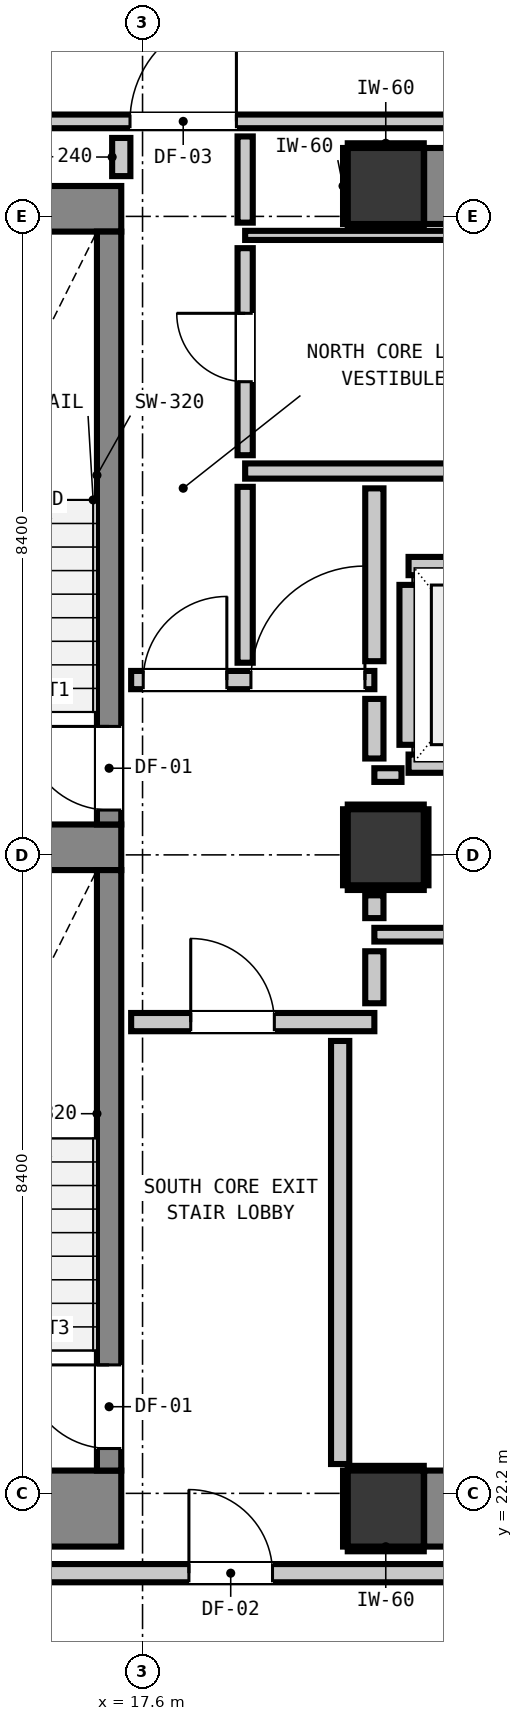
"""IFC4 building model, lengths in metres.
Left out: names, types, materials, properties, quantities, classifications, styles, units other than length and angle.
Written with IfcOpenShell. Run it as: python <this file> out.ifc"""

import sys

from ifc_helpers import new_model, si_unit, direction, frame, frame_2d, origin, origin_2d, place, context, subcontext, project, spatial, rectangle, extrude, element, fill, save


model = new_model("IFC4")
c1 = context("Model", 3, precision=1e-05, world=origin(), true_north=direction((0.0, 1.0)))
c2 = subcontext(c1, "Body", "Model", "MODEL_VIEW")
j1 = project(units=[si_unit("LENGTHUNIT", "METRE"), si_unit("PLANEANGLEUNIT", "RADIAN")], contexts=[c1])
p1 = place(None, origin())
s1 = spatial("IfcSite", under=j1, at=p1, CompositionType="ELEMENT")
p2 = place(p1, origin())
s2 = spatial("IfcBuilding", under=s1, at=p2, CompositionType="ELEMENT")
p3 = place(p2, frame((0.0, 0.0, 92.8)))
s3 = spatial("IfcBuildingStorey", under=s2, at=p3, CompositionType="ELEMENT", Elevation=92.8)
for number, where, z_axis, x_axis in (
    (1, (20.8, 22.0, 0.0), (0.0, 0.0, 1.0), (1.0, 0.0, 0.0)),
    (2, (20.8, 39.4, 0.0), (0.0, 0.0, 1.0), (1.0, 0.0, 0.0)),
):
    element("IfcColumn", number, at=place(p3, frame(where, z_axis=z_axis, x_axis=x_axis)), inside=s3, PredefinedType="COLUMN", context=c2, shape_type="SweptSolid", body=[
        extrude(rectangle(XDim=1.0, YDim=1.0, at=origin_2d()), origin(), (0.0, 0.0, 1.0), 3.32),
    ])
p4 = place(p3, frame((13.24, 22.0, 0.0), z_axis=(0.0, 0.0, 1.0), x_axis=(1.0, 0.0, 0.0)))
e3 = element("IfcWall", 3, at=p4, inside=s3, PredefinedType="SHEAR", context=c2, shape_type="SweptSolid", body=[
    extrude(rectangle(XDim=4.08, YDim=1.0, at=frame_2d((2.04, 0.0))), origin(), (0.0, 0.0, 1.0), 3.32),
])
p5 = place(p3, frame((13.24, 39.1, 0.0), z_axis=(0.0, 0.0, 1.0), x_axis=(1.0, 0.0, 0.0)))
e4 = element("IfcWall", 4, at=p5, inside=s3, PredefinedType="SHEAR", context=c2, shape_type="SweptSolid", body=[
    extrude(rectangle(XDim=4.08, YDim=0.6, at=frame_2d((2.04, 0.0))), origin(), (0.0, 0.0, 1.0), 3.32),
])
p6 = place(p3, frame((13.905, 30.7, 0.0), z_axis=(0.0, 0.0, 1.0), x_axis=(1.0, 0.0, 0.0)))
e5 = element("IfcWall", 5, at=p6, inside=s3, PredefinedType="SHEAR", context=c2, shape_type="SweptSolid", body=[
    extrude(rectangle(XDim=3.415, YDim=0.6, at=frame_2d((1.708, 0.0))), origin(), (0.0, 0.0, 1.0), 3.32),
])
for number, where, z_axis, x_axis in (
    (6, (21.305, 22.0, 0.0), (0.0, 0.0, 1.0), (1.0, 0.0, 0.0)),
    (7, (21.305, 39.4, 0.0), (0.0, 0.0, 1.0), (1.0, 0.0, 0.0)),
):
    element("IfcWall", number, at=place(p3, frame(where, z_axis=z_axis, x_axis=x_axis)), inside=s3, PredefinedType="SHEAR", context=c2, shape_type="SweptSolid", body=[
        extrude(rectangle(XDim=7.39, YDim=1.0, at=frame_2d((3.695, 0.0))), origin(), (0.0, 0.0, 1.0), 3.32),
    ])
p7 = place(p3, frame((17.16, 31.0, 0.0), z_axis=(0.0, 0.0, 1.0), x_axis=(0.0, 1.0, 0.0)))
e8 = element("IfcWall", 8, at=p7, inside=s3, PredefinedType="SHEAR", context=c2, shape_type="SweptSolid", body=[
    extrude(rectangle(XDim=7.8, YDim=0.32, at=frame_2d((3.9, 0.0))), origin(), (0.0, 0.0, 1.0), 3.32),
])
p8 = place(p7, frame((0.19, 0.0, 0.0)))
e9 = element("IfcOpeningElement", 9, at=p8, cuts=e8, PredefinedType="OPENING", context=c2, shape_type="SweptSolid", body=[
    extrude(rectangle(XDim=1.1, YDim=2.15, at=frame_2d((0.55, 1.075))), frame((0.0, 0.17, 0.0), z_axis=(0.0, -1.0, 0.0), x_axis=(1.0, 0.0, 0.0)), (0.0, 0.0, 1.0), 0.34),
])
p9 = place(p3, frame((17.16, 22.5, 0.0), z_axis=(0.0, 0.0, 1.0), x_axis=(0.0, 1.0, 0.0)))
e10 = element("IfcWall", 10, at=p9, inside=s3, PredefinedType="SHEAR", context=c2, shape_type="SweptSolid", body=[
    extrude(rectangle(XDim=7.9, YDim=0.32, at=frame_2d((3.95, 0.0))), origin(), (0.0, 0.0, 1.0), 3.32),
])
p10 = place(p9, frame((0.29, 0.0, 0.0)))
e11 = element("IfcOpeningElement", 11, at=p10, cuts=e10, PredefinedType="OPENING", context=c2, shape_type="SweptSolid", body=[
    extrude(rectangle(XDim=1.1, YDim=2.15, at=frame_2d((0.55, 1.075))), frame((0.0, 0.17, 0.0), z_axis=(0.0, -1.0, 0.0), x_axis=(1.0, 0.0, 0.0)), (0.0, 0.0, 1.0), 0.34),
])
p11 = place(p3, frame((20.8, 30.7, 0.0), z_axis=(0.0, 0.0, 1.0), x_axis=(1.0, 0.0, 0.0)))
e12 = element("IfcColumn", 12, at=p11, inside=s3, PredefinedType="COLUMN", context=c2, shape_type="SweptSolid", body=[
    extrude(rectangle(XDim=1.0, YDim=1.0, at=origin_2d()), origin(), (0.0, 0.0, 1.0), 3.32),
])
for number, where, z_axis, x_axis in (
    (13, (21.1, 31.8, 0.0), (0.0, 0.0, 1.0), (1.0, 0.0, 0.0)),
    (14, (21.1, 34.4, 0.0), (0.0, 0.0, 1.0), (1.0, 0.0, 0.0)),
):
    element("IfcWall", number, at=place(p3, frame(where, z_axis=z_axis, x_axis=x_axis)), inside=s3, PredefinedType="PARTITIONING", context=c2, shape_type="SweptSolid", body=[
        extrude(rectangle(XDim=2.2, YDim=0.24, at=frame_2d((1.1, 0.0))), origin(), (0.0, 0.0, 1.0), 3.06),
    ])
p12 = place(p3, frame((21.1, 32.048, 0.0), z_axis=(0.0, 0.0, 1.0), x_axis=(0.0, 1.0, 0.0)))
e15 = element("IfcWall", 15, at=p12, inside=s3, PredefinedType="PARTITIONING", context=c2, shape_type="SweptSolid", body=[
    extrude(rectangle(XDim=2.104, YDim=0.24, at=frame_2d((1.052, 0.0))), origin(), (0.0, 0.0, 1.0), 2.295),
])
p13 = place(p3, frame((12.993, 21.15, 0.0), z_axis=(0.0, 0.0, 1.0), x_axis=(1.0, 0.0, 0.0)))
e16 = element("IfcWall", 16, at=p13, inside=s3, PredefinedType="PARTITIONING", context=c2, shape_type="SweptSolid", body=[
    extrude(rectangle(XDim=30.98, YDim=0.24, at=frame_2d((15.49, 0.0))), origin(), (0.0, 0.0, 1.0), 3.06),
])
p14 = place(p13, frame((5.217, 0.0, 0.0)))
e17 = element("IfcOpeningElement", 17, at=p14, cuts=e16, PredefinedType="OPENING", context=c2, shape_type="SweptSolid", body=[
    extrude(rectangle(XDim=1.1, YDim=2.15, at=frame_2d((0.55, 1.075))), frame((0.0, 0.13, 0.0), z_axis=(0.0, -1.0, 0.0), x_axis=(1.0, 0.0, 0.0)), (0.0, 0.0, 1.0), 0.26),
])
p15 = place(p13, frame((25.057, 0.0, 0.0)))
e18 = element("IfcOpeningElement", 18, at=p15, cuts=e16, PredefinedType="OPENING", context=c2, shape_type="SweptSolid", body=[
    extrude(rectangle(XDim=1.4, YDim=2.15, at=frame_2d((0.7, 1.075))), frame((0.0, 0.13, 0.0), z_axis=(0.0, -1.0, 0.0), x_axis=(1.0, 0.0, 0.0)), (0.0, 0.0, 1.0), 0.26),
])
p16 = place(p3, frame((17.45, 28.4, 0.0), z_axis=(0.0, 0.0, 1.0), x_axis=(1.0, 0.0, 0.0)))
e19 = element("IfcWall", 19, at=p16, inside=s3, PredefinedType="PARTITIONING", context=c2, shape_type="SweptSolid", body=[
    extrude(rectangle(XDim=3.2, YDim=0.24, at=frame_2d((1.6, 0.0))), origin(), (0.0, 0.0, 1.0), 3.06),
])
p17 = place(p16, frame((0.784, 0.0, 0.0)))
e20 = element("IfcOpeningElement", 20, at=p17, cuts=e19, PredefinedType="OPENING", context=c2, shape_type="SweptSolid", body=[
    extrude(rectangle(XDim=1.1, YDim=2.15, at=frame_2d((0.55, 1.075))), frame((0.0, 0.13, 0.0), z_axis=(0.0, -1.0, 0.0), x_axis=(1.0, 0.0, 0.0)), (0.0, 0.0, 1.0), 0.26),
])
p18 = place(p3, frame((17.45, 32.9, 0.0), z_axis=(0.0, 0.0, 1.0), x_axis=(1.0, 0.0, 0.0)))
e21 = element("IfcWall", 21, at=p18, inside=s3, PredefinedType="PARTITIONING", context=c2, shape_type="SweptSolid", body=[
    extrude(rectangle(XDim=3.2, YDim=0.24, at=frame_2d((1.6, 0.0))), origin(), (0.0, 0.0, 1.0), 3.06),
])
p19 = place(p18, frame((0.159, 0.0, 0.0)))
e22 = element("IfcOpeningElement", 22, at=p19, cuts=e21, PredefinedType="OPENING", context=c2, shape_type="SweptSolid", body=[
    extrude(rectangle(XDim=1.1, YDim=2.15, at=frame_2d((0.55, 1.075))), frame((0.0, 0.13, 0.0), z_axis=(0.0, -1.0, 0.0), x_axis=(1.0, 0.0, 0.0)), (0.0, 0.0, 1.0), 0.26),
])
p20 = place(p18, frame((1.576, 0.0, 0.0)))
e23 = element("IfcOpeningElement", 23, at=p20, cuts=e21, PredefinedType="OPENING", context=c2, shape_type="SweptSolid", body=[
    extrude(rectangle(XDim=1.5, YDim=2.15, at=frame_2d((0.75, 1.075))), frame((0.0, 0.13, 0.0), z_axis=(0.0, -1.0, 0.0), x_axis=(1.0, 0.0, 0.0)), (0.0, 0.0, 1.0), 0.26),
])
p21 = place(p3, frame((18.95, 35.65, 0.0), z_axis=(0.0, 0.0, 1.0), x_axis=(1.0, 0.0, 0.0)))
e24 = element("IfcWall", 24, at=p21, inside=s3, PredefinedType="PARTITIONING", context=c2, shape_type="SweptSolid", body=[
    extrude(rectangle(XDim=11.025, YDim=0.2, at=frame_2d((5.513, 0.0))), origin(), (0.0, 0.0, 1.0), 3.06),
])
p22 = place(p3, frame((20.65, 29.55, 0.0), z_axis=(0.0, 0.0, 1.0), x_axis=(1.0, 0.0, 0.0)))
e25 = element("IfcWall", 25, at=p22, inside=s3, PredefinedType="PARTITIONING", context=c2, shape_type="SweptSolid", body=[
    extrude(rectangle(XDim=9.325, YDim=0.18, at=frame_2d((4.663, 0.0))), origin(), (0.0, 0.0, 1.0), 3.06),
])
p23 = place(p3, frame((20.65, 31.65, 0.0), z_axis=(0.0, 0.0, 1.0), x_axis=(1.0, 0.0, 0.0)))
e26 = element("IfcWall", 26, at=p23, inside=s3, PredefinedType="PARTITIONING", context=c2, shape_type="SweptSolid", body=[
    extrude(rectangle(XDim=0.357, YDim=0.18, at=frame_2d((0.179, 0.0))), origin(), (0.0, 0.0, 1.0), 3.06),
])
p24 = place(p3, frame((1.827, 40.25, 0.0), z_axis=(0.0, 0.0, 1.0), x_axis=(1.0, 0.0, 0.0)))
e27 = element("IfcWall", 27, at=p24, inside=s3, PredefinedType="PARTITIONING", context=c2, shape_type="SweptSolid", body=[
    extrude(rectangle(XDim=42.146, YDim=0.18, at=frame_2d((21.073, 0.0))), origin(), (0.0, 0.0, 1.0), 3.06),
])
p25 = place(p24, frame((15.608, 0.0, 0.0)))
e28 = element("IfcOpeningElement", 28, at=p25, cuts=e27, PredefinedType="OPENING", context=c2, shape_type="SweptSolid", body=[
    extrude(rectangle(XDim=1.4, YDim=2.15, at=frame_2d((0.7, 1.075))), frame((0.0, 0.1, 0.0), z_axis=(0.0, -1.0, 0.0), x_axis=(1.0, 0.0, 0.0)), (0.0, 0.0, 1.0), 0.2),
])
p26 = place(p24, frame((8.623, 0.0, 0.0)))
e29 = element("IfcOpeningElement", 29, at=p26, cuts=e27, PredefinedType="OPENING", context=c2, shape_type="SweptSolid", body=[
    extrude(rectangle(XDim=1.4, YDim=2.15, at=frame_2d((0.7, 1.075))), frame((0.0, 0.1, 0.0), z_axis=(0.0, -1.0, 0.0), x_axis=(1.0, 0.0, 0.0)), (0.0, 0.0, 1.0), 0.2),
])
p27 = place(p24, frame((36.223, 0.0, 0.0)))
e30 = element("IfcOpeningElement", 30, at=p27, cuts=e27, PredefinedType="OPENING", context=c2, shape_type="SweptSolid", body=[
    extrude(rectangle(XDim=1.4, YDim=2.15, at=frame_2d((0.7, 1.075))), frame((0.0, 0.1, 0.0), z_axis=(0.0, -1.0, 0.0), x_axis=(1.0, 0.0, 0.0)), (0.0, 0.0, 1.0), 0.2),
])
p28 = place(p24, frame((3.697, 0.0, 0.0)))
e31 = element("IfcOpeningElement", 31, at=p28, cuts=e27, PredefinedType="OPENING", context=c2, shape_type="SweptSolid", body=[
    extrude(rectangle(XDim=0.95, YDim=2.1, at=frame_2d((0.475, 1.05))), frame((0.0, 0.1, 0.0), z_axis=(0.0, -1.0, 0.0), x_axis=(1.0, 0.0, 0.0)), (0.0, 0.0, 1.0), 0.2),
])
p29 = place(p3, frame((18.95, 38.75, 0.0), z_axis=(0.0, 0.0, 1.0), x_axis=(1.0, 0.0, 0.0)))
e32 = element("IfcWall", 32, at=p29, inside=s3, PredefinedType="PARTITIONING", context=c2, shape_type="SweptSolid", body=[
    extrude(rectangle(XDim=13.56, YDim=0.12, at=frame_2d((6.78, 0.0))), origin(), (0.0, 0.0, 1.0), 3.06),
])
p30 = place(p3, frame((17.32, 39.53, 0.0), z_axis=(0.0, 0.0, 1.0), x_axis=(0.0, 1.0, 0.0)))
e33 = element("IfcWall", 33, at=p30, inside=s3, PredefinedType="PARTITIONING", context=c2, shape_type="SweptSolid", body=[
    extrude(rectangle(XDim=0.502, YDim=0.24, at=frame_2d((0.251, 0.0))), origin(), (0.0, 0.0, 1.0), 3.06),
])
p31 = place(p3, frame((20.2, 22.586, 0.0), z_axis=(0.0, 0.0, 1.0), x_axis=(0.0, 1.0, 0.0)))
e34 = element("IfcWall", 34, at=p31, inside=s3, PredefinedType="PARTITIONING", context=c2, shape_type="SweptSolid", body=[
    extrude(rectangle(XDim=5.566, YDim=0.24, at=frame_2d((2.783, 0.0))), origin(), (0.0, 0.0, 1.0), 3.06),
])
p32 = place(p3, frame((20.65, 28.648, 0.0), z_axis=(0.0, 0.0, 1.0), x_axis=(0.0, 1.0, 0.0)))
e35 = element("IfcWall", 35, at=p32, inside=s3, PredefinedType="PARTITIONING", context=c2, shape_type="SweptSolid", body=[
    extrude(rectangle(XDim=0.684, YDim=0.24, at=frame_2d((0.342, 0.0))), origin(), (0.0, 0.0, 1.0), 2.295),
])
p33 = place(p3, frame((20.65, 29.768, 0.0), z_axis=(0.0, 0.0, 1.0), x_axis=(0.0, 1.0, 0.0)))
e36 = element("IfcWall", 36, at=p33, inside=s3, PredefinedType="PARTITIONING", context=c2, shape_type="SweptSolid", body=[
    extrude(rectangle(XDim=0.3, YDim=0.24, at=frame_2d((0.15, 0.0))), origin(), (0.0, 0.0, 1.0), 2.295),
])
p34 = place(p3, frame((20.65, 31.868, 0.0), z_axis=(0.0, 0.0, 1.0), x_axis=(0.0, 1.0, 0.0)))
e37 = element("IfcWall", 37, at=p34, inside=s3, PredefinedType="PARTITIONING", context=c2, shape_type="SweptSolid", body=[
    extrude(rectangle(XDim=0.784, YDim=0.24, at=frame_2d((0.392, 0.0))), origin(), (0.0, 0.0, 1.0), 2.295),
])
p35 = place(p3, frame((20.65, 33.148, 0.0), z_axis=(0.0, 0.0, 1.0), x_axis=(0.0, 1.0, 0.0)))
e38 = element("IfcWall", 38, at=p35, inside=s3, PredefinedType="PARTITIONING", context=c2, shape_type="SweptSolid", body=[
    extrude(rectangle(XDim=2.274, YDim=0.24, at=frame_2d((1.137, 0.0))), origin(), (0.0, 0.0, 1.0), 2.295),
])
p36 = place(p3, frame((18.95, 33.128, 0.0), z_axis=(0.0, 0.0, 1.0), x_axis=(0.0, 1.0, 0.0)))
e39 = element("IfcWall", 39, at=p36, inside=s3, PredefinedType="PARTITIONING", context=c2, shape_type="SweptSolid", body=[
    extrude(rectangle(XDim=2.314, YDim=0.2, at=frame_2d((1.157, 0.0))), origin(), (0.0, 0.0, 1.0), 3.06),
])
p37 = place(p3, frame((18.95, 35.858, 0.0), z_axis=(0.0, 0.0, 1.0), x_axis=(0.0, 1.0, 0.0)))
e40 = element("IfcWall", 40, at=p37, inside=s3, PredefinedType="PARTITIONING", context=c2, shape_type="SweptSolid", body=[
    extrude(rectangle(XDim=2.724, YDim=0.2, at=frame_2d((1.362, 0.0))), origin(), (0.0, 0.0, 1.0), 3.06),
])
p38 = place(p37, frame((0.967, 0.0, 0.0)))
e41 = element("IfcOpeningElement", 41, at=p38, cuts=e40, PredefinedType="OPENING", context=c2, shape_type="SweptSolid", body=[
    extrude(rectangle(XDim=0.9, YDim=2.1, at=frame_2d((0.45, 1.05))), frame((0.0, 0.11, 0.0), z_axis=(0.0, -1.0, 0.0), x_axis=(1.0, 0.0, 0.0)), (0.0, 0.0, 1.0), 0.22),
])
p39 = place(p3, frame((18.95, 38.918, 0.0), z_axis=(0.0, 0.0, 1.0), x_axis=(0.0, 1.0, 0.0)))
e42 = element("IfcWall", 42, at=p39, inside=s3, PredefinedType="PARTITIONING", context=c2, shape_type="SweptSolid", body=[
    extrude(rectangle(XDim=1.134, YDim=0.2, at=frame_2d((0.567, 0.0))), origin(), (0.0, 0.0, 1.0), 3.06),
])
for number, where, z_axis, x_axis in (
    (43, (20.3, 21.468, 0.0), (0.0, 0.0, 1.0), (1.0, 0.0, 0.0)),
    (44, (20.3, 22.532, 0.0), (0.0, 0.0, 1.0), (1.0, 0.0, 0.0)),
    (45, (20.268, 21.5, 0.0), (0.0, 0.0, 1.0), (0.0, 1.0, 0.0)),
    (46, (20.3, 38.868, 0.0), (0.0, 0.0, 1.0), (1.0, 0.0, 0.0)),
    (47, (20.3, 39.932, 0.0), (0.0, 0.0, 1.0), (1.0, 0.0, 0.0)),
    (48, (20.268, 38.9, 0.0), (0.0, 0.0, 1.0), (0.0, 1.0, 0.0)),
    (49, (20.3, 30.168, 0.0), (0.0, 0.0, 1.0), (1.0, 0.0, 0.0)),
    (50, (20.3, 31.232, 0.0), (0.0, 0.0, 1.0), (1.0, 0.0, 0.0)),
    (51, (20.268, 30.2, 0.0), (0.0, 0.0, 1.0), (0.0, 1.0, 0.0)),
    (52, (21.332, 30.2, 0.0), (0.0, 0.0, 1.0), (0.0, 1.0, 0.0)),
):
    element("IfcWall", number, at=place(p3, frame(where, z_axis=z_axis, x_axis=x_axis)), inside=s3, PredefinedType="PARTITIONING", context=c2, shape_type="SweptSolid", body=[
        extrude(rectangle(XDim=1.0, YDim=0.06, at=frame_2d((0.5, 0.0))), origin(), (0.0, 0.0, 1.0), 1.45),
    ])
p40 = place(p8, origin())
e53 = element("IfcDoor", 53, at=p40, inside=s3, OperationType="SINGLE_SWING_RIGHT", PredefinedType="DOOR", context=c2, shape_type="SweptSolid", body=[
    extrude(rectangle(XDim=1.1, YDim=2.15, at=frame_2d((0.55, 1.075))), frame((0.0, 0.025, 0.0), z_axis=(0.0, -1.0, 0.0), x_axis=(1.0, 0.0, 0.0)), (0.0, 0.0, 1.0), 0.05),
])
fill(e9, e53)
p41 = place(p10, origin())
e54 = element("IfcDoor", 54, at=p41, inside=s3, OperationType="SINGLE_SWING_RIGHT", PredefinedType="DOOR", context=c2, shape_type="SweptSolid", body=[
    extrude(rectangle(XDim=1.1, YDim=2.15, at=frame_2d((0.55, 1.075))), frame((0.0, 0.025, 0.0), z_axis=(0.0, -1.0, 0.0), x_axis=(1.0, 0.0, 0.0)), (0.0, 0.0, 1.0), 0.05),
])
fill(e11, e54)
p42 = place(p17, origin())
e55 = element("IfcDoor", 55, at=p42, inside=s3, OperationType="SINGLE_SWING_LEFT", PredefinedType="DOOR", context=c2, shape_type="SweptSolid", body=[
    extrude(rectangle(XDim=1.1, YDim=2.15, at=frame_2d((0.55, 1.075))), frame((0.0, 0.025, 0.0), z_axis=(0.0, -1.0, 0.0), x_axis=(1.0, 0.0, 0.0)), (0.0, 0.0, 1.0), 0.05),
])
fill(e20, e55)
p43 = place(p19, origin())
e56 = element("IfcDoor", 56, at=p43, inside=s3, OperationType="SINGLE_SWING_RIGHT", PredefinedType="DOOR", context=c2, shape_type="SweptSolid", body=[
    extrude(rectangle(XDim=1.1, YDim=2.15, at=frame_2d((0.55, 1.075))), frame((0.0, 0.025, 0.0), z_axis=(0.0, -1.0, 0.0), x_axis=(1.0, 0.0, 0.0)), (0.0, 0.0, 1.0), 0.05),
])
fill(e22, e56)
p44 = place(p14, origin())
e57 = element("IfcDoor", 57, at=p44, inside=s3, OperationType="SINGLE_SWING_LEFT", PredefinedType="DOOR", context=c2, shape_type="SweptSolid", body=[
    extrude(rectangle(XDim=1.1, YDim=2.15, at=frame_2d((0.55, 1.075))), frame((0.0, 0.025, 0.0), z_axis=(0.0, -1.0, 0.0), x_axis=(1.0, 0.0, 0.0)), (0.0, 0.0, 1.0), 0.05),
])
fill(e17, e57)
p45 = place(p25, origin())
e58 = element("IfcDoor", 58, at=p45, inside=s3, OperationType="SINGLE_SWING_RIGHT", PredefinedType="DOOR", context=c2, shape_type="SweptSolid", body=[
    extrude(rectangle(XDim=1.4, YDim=2.15, at=frame_2d((0.7, 1.075))), frame((0.0, 0.025, 0.0), z_axis=(0.0, -1.0, 0.0), x_axis=(1.0, 0.0, 0.0)), (0.0, 0.0, 1.0), 0.05),
])
fill(e28, e58)
p46 = place(p20, origin())
e59 = element("IfcDoor", 59, at=p46, inside=s3, OperationType="SINGLE_SWING_RIGHT", PredefinedType="DOOR", context=c2, shape_type="SweptSolid", body=[
    extrude(rectangle(XDim=1.5, YDim=2.15, at=frame_2d((0.75, 1.075))), frame((0.0, 0.025, 0.0), z_axis=(0.0, -1.0, 0.0), x_axis=(1.0, 0.0, 0.0)), (0.0, 0.0, 1.0), 0.05),
])
fill(e23, e59)
p47 = place(p38, origin())
e60 = element("IfcDoor", 60, at=p47, inside=s3, OperationType="SINGLE_SWING_RIGHT", PredefinedType="DOOR", context=c2, shape_type="SweptSolid", body=[
    extrude(rectangle(XDim=0.9, YDim=2.1, at=frame_2d((0.45, 1.05))), frame((0.0, 0.025, 0.0), z_axis=(0.0, -1.0, 0.0), x_axis=(1.0, 0.0, 0.0)), (0.0, 0.0, 1.0), 0.05),
])
fill(e41, e60)
save(model, sys.argv[1])
